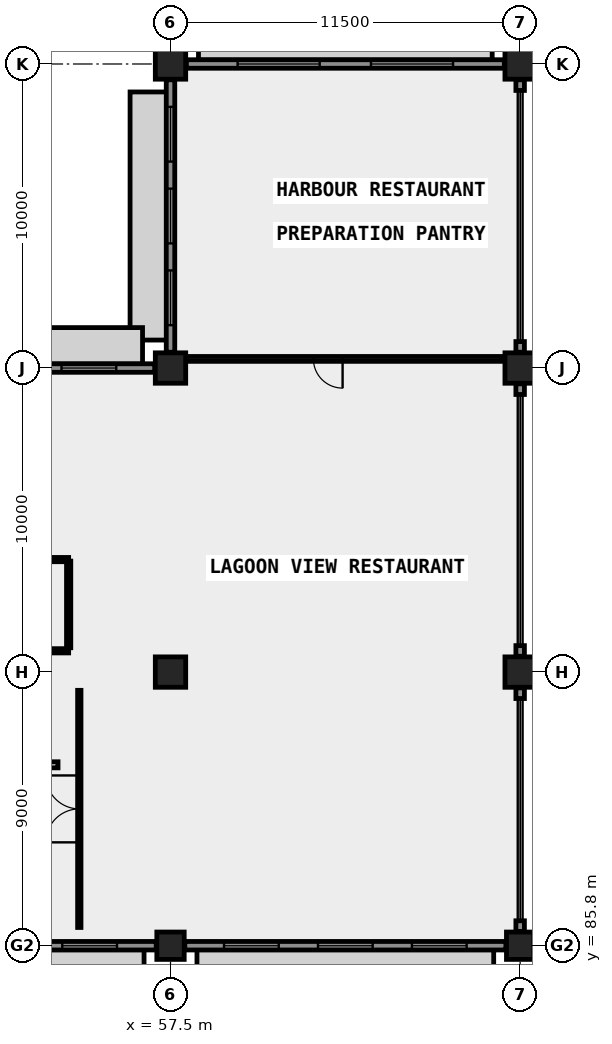
"""IFC4 building model, lengths in metres.
Left out: names, types, materials, properties, quantities, classifications, styles, units other than length and angle.
Written with IfcOpenShell. Run it as: python <this file> out.ifc"""

import sys

from ifc_helpers import new_model, si_unit, direction, frame, frame_2d, origin, origin_2d, place, context, subcontext, project, spatial, rectangle, extrude, element, fill, save


model = new_model("IFC4")
c1 = context("Model", 3, precision=1e-05, world=origin(), true_north=direction((0.0, 1.0)))
c2 = subcontext(c1, "Body", "Model", "MODEL_VIEW")
j1 = project(units=[si_unit("LENGTHUNIT", "METRE"), si_unit("PLANEANGLEUNIT", "RADIAN")], contexts=[c1])
p1 = place(None, origin())
s1 = spatial("IfcSite", under=j1, at=p1, CompositionType="ELEMENT")
p2 = place(p1, origin())
s2 = spatial("IfcBuilding", under=s1, at=p2, CompositionType="ELEMENT")
p3 = place(p2, frame((0.0, 0.0, 13.8)))
s3 = spatial("IfcBuildingStorey", under=s2, at=p3, CompositionType="ELEMENT", Elevation=13.8)
p4 = place(p3, frame((57.5, 85.8, 0.0), z_axis=(0.0, 0.0, 1.0), x_axis=(1.0, 0.0, 0.0)))
e1 = element("IfcColumn", 1, at=p4, inside=s3, PredefinedType="COLUMN", context=c2, shape_type="SweptSolid", body=[
    extrude(rectangle(XDim=0.9, YDim=0.9, at=origin_2d()), origin(), (0.0, 0.0, 1.0), 4.5),
])
for number, where, z_axis, x_axis in (
    (2, (57.5, 94.8, 0.0), (0.0, 0.0, 1.0), (1.0, 0.0, 0.0)),
    (3, (57.5, 104.8, 0.0), (0.0, 0.0, 1.0), (1.0, 0.0, 0.0)),
    (4, (57.5, 114.8, 0.0), (0.0, 0.0, 1.0), (1.0, 0.0, 0.0)),
):
    element("IfcColumn", number, at=place(p3, frame(where, z_axis=z_axis, x_axis=x_axis)), inside=s3, PredefinedType="COLUMN", context=c2, shape_type="SweptSolid", body=[
        extrude(rectangle(XDim=1.0, YDim=1.0, at=origin_2d()), origin(), (0.0, 0.0, 1.0), 4.5),
    ])
p5 = place(p3, frame((69.0, 85.8, 0.0), z_axis=(0.0, 0.0, 1.0), x_axis=(1.0, 0.0, 0.0)))
e5 = element("IfcColumn", 5, at=p5, inside=s3, PredefinedType="COLUMN", context=c2, shape_type="SweptSolid", body=[
    extrude(rectangle(XDim=0.9, YDim=0.9, at=origin_2d()), origin(), (0.0, 0.0, 1.0), 4.5),
])
for number, where, z_axis, x_axis in (
    (6, (69.0, 94.8, 0.0), (0.0, 0.0, 1.0), (1.0, 0.0, 0.0)),
    (7, (69.0, 104.8, 0.0), (0.0, 0.0, 1.0), (1.0, 0.0, 0.0)),
    (8, (69.0, 114.8, 0.0), (0.0, 0.0, 1.0), (1.0, 0.0, 0.0)),
):
    element("IfcColumn", number, at=place(p3, frame(where, z_axis=z_axis, x_axis=x_axis)), inside=s3, PredefinedType="COLUMN", context=c2, shape_type="SweptSolid", body=[
        extrude(rectangle(XDim=1.0, YDim=1.0, at=origin_2d()), origin(), (0.0, 0.0, 1.0), 4.5),
    ])
p6 = place(p3, frame((46.47, 85.8, 0.0), z_axis=(0.0, 0.0, 1.0), x_axis=(1.0, 0.0, 0.0)))
e9 = element("IfcWall", 9, at=p6, inside=s3, PredefinedType="SOLIDWALL", context=c2, shape_type="SweptSolid", body=[
    extrude(rectangle(XDim=10.56, YDim=0.28, at=frame_2d((5.28, 0.0))), origin(), (0.0, 0.0, 1.0), 3.45),
])
p7 = place(p6, frame((1.29, 0.0, 0.85)))
e10 = element("IfcOpeningElement", 10, at=p7, cuts=e9, PredefinedType="OPENING", context=c2, shape_type="SweptSolid", body=[
    extrude(rectangle(XDim=1.8, YDim=1.95, at=frame_2d((0.9, 0.975))), frame((0.0, 0.15, 0.0), z_axis=(0.0, -1.0, 0.0), x_axis=(1.0, 0.0, 0.0)), (0.0, 0.0, 1.0), 0.3),
])
p8 = place(p6, frame((4.38, 0.0, 0.85)))
e11 = element("IfcOpeningElement", 11, at=p8, cuts=e9, PredefinedType="OPENING", context=c2, shape_type="SweptSolid", body=[
    extrude(rectangle(XDim=1.8, YDim=1.95, at=frame_2d((0.9, 0.975))), frame((0.0, 0.15, 0.0), z_axis=(0.0, -1.0, 0.0), x_axis=(1.0, 0.0, 0.0)), (0.0, 0.0, 1.0), 0.3),
])
p9 = place(p6, frame((7.47, 0.0, 0.85)))
e12 = element("IfcOpeningElement", 12, at=p9, cuts=e9, PredefinedType="OPENING", context=c2, shape_type="SweptSolid", body=[
    extrude(rectangle(XDim=1.8, YDim=1.95, at=frame_2d((0.9, 0.975))), frame((0.0, 0.15, 0.0), z_axis=(0.0, -1.0, 0.0), x_axis=(1.0, 0.0, 0.0)), (0.0, 0.0, 1.0), 0.3),
])
p10 = place(p3, frame((57.97, 85.8, 0.0), z_axis=(0.0, 0.0, 1.0), x_axis=(1.0, 0.0, 0.0)))
e13 = element("IfcWall", 13, at=p10, inside=s3, PredefinedType="SOLIDWALL", context=c2, shape_type="SweptSolid", body=[
    extrude(rectangle(XDim=10.56, YDim=0.28, at=frame_2d((5.28, 0.0))), origin(), (0.0, 0.0, 1.0), 3.45),
])
p11 = place(p10, frame((1.29, 0.0, 0.85)))
e14 = element("IfcOpeningElement", 14, at=p11, cuts=e13, PredefinedType="OPENING", context=c2, shape_type="SweptSolid", body=[
    extrude(rectangle(XDim=1.8, YDim=1.95, at=frame_2d((0.9, 0.975))), frame((0.0, 0.15, 0.0), z_axis=(0.0, -1.0, 0.0), x_axis=(1.0, 0.0, 0.0)), (0.0, 0.0, 1.0), 0.3),
])
p12 = place(p10, frame((4.38, 0.0, 0.85)))
e15 = element("IfcOpeningElement", 15, at=p12, cuts=e13, PredefinedType="OPENING", context=c2, shape_type="SweptSolid", body=[
    extrude(rectangle(XDim=1.8, YDim=1.95, at=frame_2d((0.9, 0.975))), frame((0.0, 0.15, 0.0), z_axis=(0.0, -1.0, 0.0), x_axis=(1.0, 0.0, 0.0)), (0.0, 0.0, 1.0), 0.3),
])
p13 = place(p10, frame((7.47, 0.0, 0.85)))
e16 = element("IfcOpeningElement", 16, at=p13, cuts=e13, PredefinedType="OPENING", context=c2, shape_type="SweptSolid", body=[
    extrude(rectangle(XDim=1.8, YDim=1.95, at=frame_2d((0.9, 0.975))), frame((0.0, 0.15, 0.0), z_axis=(0.0, -1.0, 0.0), x_axis=(1.0, 0.0, 0.0)), (0.0, 0.0, 1.0), 0.3),
])
for number, where, z_axis, x_axis in (
    (17, (69.0, 86.27, 0.0), (0.0, 0.0, 1.0), (0.0, 1.0, 0.0)),
    (18, (69.0, 93.93, 0.0), (0.0, 0.0, 1.0), (0.0, 1.0, 0.0)),
):
    element("IfcWall", number, at=place(p3, frame(where, z_axis=z_axis, x_axis=x_axis)), inside=s3, PredefinedType="SOLIDWALL", context=c2, shape_type="SweptSolid", body=[
        extrude(rectangle(XDim=0.35, YDim=0.28, at=frame_2d((0.175, 0.0))), origin(), (0.0, 0.0, 1.0), 4.23),
    ])
p14 = place(p3, frame((69.0, 95.32, 0.0), z_axis=(0.0, 0.0, 1.0), x_axis=(0.0, 1.0, 0.0)))
e19 = element("IfcWall", 19, at=p14, inside=s3, PredefinedType="SOLIDWALL", context=c2, shape_type="SweptSolid", body=[
    extrude(rectangle(XDim=0.35, YDim=0.28, at=frame_2d((0.175, 0.0))), origin(), (0.0, 0.0, 1.0), 4.23),
])
p15 = place(p3, frame((69.0, 103.93, 0.0), z_axis=(0.0, 0.0, 1.0), x_axis=(0.0, 1.0, 0.0)))
e20 = element("IfcWall", 20, at=p15, inside=s3, PredefinedType="SOLIDWALL", context=c2, shape_type="SweptSolid", body=[
    extrude(rectangle(XDim=0.35, YDim=0.28, at=frame_2d((0.175, 0.0))), origin(), (0.0, 0.0, 1.0), 4.23),
])
p16 = place(p3, frame((69.0, 105.32, 0.0), z_axis=(0.0, 0.0, 1.0), x_axis=(0.0, 1.0, 0.0)))
e21 = element("IfcWall", 21, at=p16, inside=s3, PredefinedType="SOLIDWALL", context=c2, shape_type="SweptSolid", body=[
    extrude(rectangle(XDim=0.35, YDim=0.28, at=frame_2d((0.175, 0.0))), origin(), (0.0, 0.0, 1.0), 4.23),
])
p17 = place(p3, frame((69.0, 113.93, 0.0), z_axis=(0.0, 0.0, 1.0), x_axis=(0.0, 1.0, 0.0)))
e22 = element("IfcWall", 22, at=p17, inside=s3, PredefinedType="SOLIDWALL", context=c2, shape_type="SweptSolid", body=[
    extrude(rectangle(XDim=0.35, YDim=0.28, at=frame_2d((0.175, 0.0))), origin(), (0.0, 0.0, 1.0), 4.23),
])
p18 = place(p3, frame((58.02, 114.8, 0.0), z_axis=(0.0, 0.0, 1.0), x_axis=(1.0, 0.0, 0.0)))
e23 = element("IfcWall", 23, at=p18, inside=s3, PredefinedType="SOLIDWALL", context=c2, shape_type="SweptSolid", body=[
    extrude(rectangle(XDim=10.46, YDim=0.28, at=frame_2d((5.23, 0.0))), origin(), (0.0, 0.0, 1.0), 3.45),
])
p19 = place(p18, frame((1.687, 0.0, 0.85)))
e24 = element("IfcOpeningElement", 24, at=p19, cuts=e23, PredefinedType="OPENING", context=c2, shape_type="SweptSolid", body=[
    extrude(rectangle(XDim=2.7, YDim=2.15, at=frame_2d((1.35, 1.075))), frame((0.0, 0.15, 0.0), z_axis=(0.0, -1.0, 0.0), x_axis=(1.0, 0.0, 0.0)), (0.0, 0.0, 1.0), 0.3),
])
p20 = place(p18, frame((6.073, 0.0, 0.85)))
e25 = element("IfcOpeningElement", 25, at=p20, cuts=e23, PredefinedType="OPENING", context=c2, shape_type="SweptSolid", body=[
    extrude(rectangle(XDim=2.7, YDim=2.15, at=frame_2d((1.35, 1.075))), frame((0.0, 0.15, 0.0), z_axis=(0.0, -1.0, 0.0), x_axis=(1.0, 0.0, 0.0)), (0.0, 0.0, 1.0), 0.3),
])
p21 = place(p3, frame((57.5, 105.32, 0.0), z_axis=(0.0, 0.0, 1.0), x_axis=(0.0, 1.0, 0.0)))
e26 = element("IfcWall", 26, at=p21, inside=s3, PredefinedType="SOLIDWALL", context=c2, shape_type="SweptSolid", body=[
    extrude(rectangle(XDim=8.96, YDim=0.28, at=frame_2d((4.48, 0.0))), origin(), (0.0, 0.0, 1.0), 3.45),
])
p22 = place(p21, frame((0.89, 0.0, 0.85)))
e27 = element("IfcOpeningElement", 27, at=p22, cuts=e26, PredefinedType="OPENING", context=c2, shape_type="SweptSolid", body=[
    extrude(rectangle(XDim=1.8, YDim=1.95, at=frame_2d((0.9, 0.975))), frame((0.0, 0.15, 0.0), z_axis=(0.0, -1.0, 0.0), x_axis=(1.0, 0.0, 0.0)), (0.0, 0.0, 1.0), 0.3),
])
p23 = place(p21, frame((3.58, 0.0, 0.85)))
e28 = element("IfcOpeningElement", 28, at=p23, cuts=e26, PredefinedType="OPENING", context=c2, shape_type="SweptSolid", body=[
    extrude(rectangle(XDim=1.8, YDim=1.95, at=frame_2d((0.9, 0.975))), frame((0.0, 0.15, 0.0), z_axis=(0.0, -1.0, 0.0), x_axis=(1.0, 0.0, 0.0)), (0.0, 0.0, 1.0), 0.3),
])
p24 = place(p21, frame((6.27, 0.0, 0.85)))
e29 = element("IfcOpeningElement", 29, at=p24, cuts=e26, PredefinedType="OPENING", context=c2, shape_type="SweptSolid", body=[
    extrude(rectangle(XDim=1.8, YDim=1.95, at=frame_2d((0.9, 0.975))), frame((0.0, 0.15, 0.0), z_axis=(0.0, -1.0, 0.0), x_axis=(1.0, 0.0, 0.0)), (0.0, 0.0, 1.0), 0.3),
])
p25 = place(p3, frame((46.52, 104.8, 0.0), z_axis=(0.0, 0.0, 1.0), x_axis=(1.0, 0.0, 0.0)))
e30 = element("IfcWall", 30, at=p25, inside=s3, PredefinedType="SOLIDWALL", context=c2, shape_type="SweptSolid", body=[
    extrude(rectangle(XDim=10.46, YDim=0.28, at=frame_2d((5.23, 0.0))), origin(), (0.0, 0.0, 1.0), 3.45),
])
p26 = place(p25, frame((1.265, 0.0, 0.85)))
e31 = element("IfcOpeningElement", 31, at=p26, cuts=e30, PredefinedType="OPENING", context=c2, shape_type="SweptSolid", body=[
    extrude(rectangle(XDim=1.8, YDim=1.95, at=frame_2d((0.9, 0.975))), frame((0.0, 0.15, 0.0), z_axis=(0.0, -1.0, 0.0), x_axis=(1.0, 0.0, 0.0)), (0.0, 0.0, 1.0), 0.3),
])
p27 = place(p25, frame((4.33, 0.0, 0.85)))
e32 = element("IfcOpeningElement", 32, at=p27, cuts=e30, PredefinedType="OPENING", context=c2, shape_type="SweptSolid", body=[
    extrude(rectangle(XDim=1.8, YDim=1.95, at=frame_2d((0.9, 0.975))), frame((0.0, 0.15, 0.0), z_axis=(0.0, -1.0, 0.0), x_axis=(1.0, 0.0, 0.0)), (0.0, 0.0, 1.0), 0.3),
])
p28 = place(p25, frame((7.395, 0.0, 0.85)))
e33 = element("IfcOpeningElement", 33, at=p28, cuts=e30, PredefinedType="OPENING", context=c2, shape_type="SweptSolid", body=[
    extrude(rectangle(XDim=1.8, YDim=1.95, at=frame_2d((0.9, 0.975))), frame((0.0, 0.15, 0.0), z_axis=(0.0, -1.0, 0.0), x_axis=(1.0, 0.0, 0.0)), (0.0, 0.0, 1.0), 0.3),
])
p29 = place(p3, frame((47.55, 95.5, 0.0), z_axis=(0.0, 0.0, 1.0), x_axis=(1.0, 0.0, 0.0)))
e34 = element("IfcWall", 34, at=p29, inside=s3, PredefinedType="PLUMBINGWALL", context=c2, shape_type="SweptSolid", body=[
    extrude(rectangle(XDim=6.6, YDim=0.14, at=frame_2d((3.3, 0.0))), origin(), (0.0, 0.0, 1.0), 4.22),
])
p30 = place(p29, frame((0.72, 0.0, 0.0)))
e35 = element("IfcOpeningElement", 35, at=p30, cuts=e34, PredefinedType="OPENING", context=c2, shape_type="SweptSolid", body=[
    extrude(rectangle(XDim=0.95, YDim=2.1, at=frame_2d((0.475, 1.05))), frame((0.0, 0.08, 0.0), z_axis=(0.0, -1.0, 0.0), x_axis=(1.0, 0.0, 0.0)), (0.0, 0.0, 1.0), 0.16),
])
p31 = place(p29, frame((2.9, 0.0, 0.0)))
e36 = element("IfcOpeningElement", 36, at=p31, cuts=e34, PredefinedType="OPENING", context=c2, shape_type="SweptSolid", body=[
    extrude(rectangle(XDim=0.92, YDim=2.1, at=frame_2d((0.46, 1.05))), frame((0.0, 0.08, 0.0), z_axis=(0.0, -1.0, 0.0), x_axis=(1.0, 0.0, 0.0)), (0.0, 0.0, 1.0), 0.16),
])
p32 = place(p29, frame((5.0, 0.0, 0.0)))
e37 = element("IfcOpeningElement", 37, at=p32, cuts=e34, PredefinedType="OPENING", context=c2, shape_type="SweptSolid", body=[
    extrude(rectangle(XDim=0.92, YDim=2.1, at=frame_2d((0.46, 1.05))), frame((0.0, 0.08, 0.0), z_axis=(0.0, -1.0, 0.0), x_axis=(1.0, 0.0, 0.0)), (0.0, 0.0, 1.0), 0.16),
])
p33 = place(p3, frame((54.15, 95.6, 0.0), z_axis=(0.0, 0.0, 1.0), x_axis=(0.0, 1.0, 0.0)))
e38 = element("IfcWall", 38, at=p33, inside=s3, PredefinedType="PLUMBINGWALL", context=c2, shape_type="SweptSolid", body=[
    extrude(rectangle(XDim=2.85, YDim=0.14, at=frame_2d((1.425, 0.0))), origin(), (0.0, 0.0, 1.0), 4.22),
])
p34 = place(p3, frame((47.55, 98.5, 0.0), z_axis=(0.0, 0.0, 1.0), x_axis=(1.0, 0.0, 0.0)))
e39 = element("IfcWall", 39, at=p34, inside=s3, PredefinedType="PLUMBINGWALL", context=c2, shape_type="SweptSolid", body=[
    extrude(rectangle(XDim=6.6, YDim=0.14, at=frame_2d((3.3, 0.0))), origin(), (0.0, 0.0, 1.0), 4.22),
])
p35 = place(p3, frame((24.4, 91.75, 0.0), z_axis=(0.0, 0.0, 1.0), x_axis=(1.0, 0.0, 0.0)))
e40 = element("IfcWall", 40, at=p35, inside=s3, PredefinedType="PARTITIONING", context=c2, shape_type="SweptSolid", body=[
    extrude(rectangle(XDim=29.4, YDim=0.2, at=frame_2d((14.7, 0.0))), origin(), (0.0, 0.0, 1.0), 4.22),
])
p36 = place(p35, frame((4.2, 0.0, 0.0)))
e41 = element("IfcOpeningElement", 41, at=p36, cuts=e40, PredefinedType="OPENING", context=c2, shape_type="SweptSolid", body=[
    extrude(rectangle(XDim=1.8, YDim=2.2, at=frame_2d((0.9, 1.1))), frame((0.0, 0.11, 0.0), z_axis=(0.0, -1.0, 0.0), x_axis=(1.0, 0.0, 0.0)), (0.0, 0.0, 1.0), 0.22),
])
p37 = place(p35, frame((16.5, 0.0, 0.0)))
e42 = element("IfcOpeningElement", 42, at=p37, cuts=e40, PredefinedType="OPENING", context=c2, shape_type="SweptSolid", body=[
    extrude(rectangle(XDim=0.98, YDim=2.15, at=frame_2d((0.49, 1.075))), frame((0.0, 0.11, 0.0), z_axis=(0.0, -1.0, 0.0), x_axis=(1.0, 0.0, 0.0)), (0.0, 0.0, 1.0), 0.22),
])
p38 = place(p3, frame((54.5, 86.4, 0.0), z_axis=(0.0, 0.0, 1.0), x_axis=(0.0, 1.0, 0.0)))
e43 = element("IfcWall", 43, at=p38, inside=s3, PredefinedType="MOVABLE", context=c2, shape_type="SweptSolid", body=[
    extrude(rectangle(XDim=7.8, YDim=0.11, at=frame_2d((3.9, 0.0))), origin(), (0.0, 0.0, 1.0), 4.22),
])
p39 = place(p38, frame((2.8, 0.0, 0.0)))
e44 = element("IfcOpeningElement", 44, at=p39, cuts=e43, PredefinedType="OPENING", context=c2, shape_type="SweptSolid", body=[
    extrude(rectangle(XDim=2.2, YDim=2.4, at=frame_2d((1.1, 1.2))), frame((0.0, 0.065, 0.0), z_axis=(0.0, -1.0, 0.0), x_axis=(1.0, 0.0, 0.0)), (0.0, 0.0, 1.0), 0.13),
])
p40 = place(p3, frame((58.0, 105.1, 0.0), z_axis=(0.0, 0.0, 1.0), x_axis=(1.0, 0.0, 0.0)))
e45 = element("IfcWall", 45, at=p40, inside=s3, PredefinedType="PARTITIONING", context=c2, shape_type="SweptSolid", body=[
    extrude(rectangle(XDim=10.4, YDim=0.16, at=frame_2d((5.2, 0.0))), origin(), (0.0, 0.0, 1.0), 4.22),
])
p41 = place(p40, frame((4.2, 0.0, 0.0)))
e46 = element("IfcOpeningElement", 46, at=p41, cuts=e45, PredefinedType="OPENING", context=c2, shape_type="SweptSolid", body=[
    extrude(rectangle(XDim=0.96, YDim=2.1, at=frame_2d((0.48, 1.05))), frame((0.0, 0.09, 0.0), z_axis=(0.0, -1.0, 0.0), x_axis=(1.0, 0.0, 0.0)), (0.0, 0.0, 1.0), 0.18),
])
p42 = place(p9, origin())
e47 = element("IfcWindow", 47, at=p42, inside=s3, PartitioningType="SINGLE_PANEL", PredefinedType="WINDOW", context=c2, shape_type="SweptSolid", body=[
    extrude(rectangle(XDim=1.8, YDim=1.95, at=frame_2d((0.9, 0.975))), frame((0.0, 0.03, 0.0), z_axis=(0.0, -1.0, 0.0), x_axis=(1.0, 0.0, 0.0)), (0.0, 0.0, 1.0), 0.06),
])
fill(e12, e47)
p43 = place(p11, origin())
e48 = element("IfcWindow", 48, at=p43, inside=s3, PartitioningType="SINGLE_PANEL", PredefinedType="WINDOW", context=c2, shape_type="SweptSolid", body=[
    extrude(rectangle(XDim=1.8, YDim=1.95, at=frame_2d((0.9, 0.975))), frame((0.0, 0.03, 0.0), z_axis=(0.0, -1.0, 0.0), x_axis=(1.0, 0.0, 0.0)), (0.0, 0.0, 1.0), 0.06),
])
fill(e14, e48)
p44 = place(p12, origin())
e49 = element("IfcWindow", 49, at=p44, inside=s3, PartitioningType="SINGLE_PANEL", PredefinedType="WINDOW", context=c2, shape_type="SweptSolid", body=[
    extrude(rectangle(XDim=1.8, YDim=1.95, at=frame_2d((0.9, 0.975))), frame((0.0, 0.03, 0.0), z_axis=(0.0, -1.0, 0.0), x_axis=(1.0, 0.0, 0.0)), (0.0, 0.0, 1.0), 0.06),
])
fill(e15, e49)
p45 = place(p13, origin())
e50 = element("IfcWindow", 50, at=p45, inside=s3, PartitioningType="SINGLE_PANEL", PredefinedType="WINDOW", context=c2, shape_type="SweptSolid", body=[
    extrude(rectangle(XDim=1.8, YDim=1.95, at=frame_2d((0.9, 0.975))), frame((0.0, 0.03, 0.0), z_axis=(0.0, -1.0, 0.0), x_axis=(1.0, 0.0, 0.0)), (0.0, 0.0, 1.0), 0.06),
])
fill(e16, e50)
p46 = place(p19, origin())
e51 = element("IfcWindow", 51, at=p46, inside=s3, PartitioningType="SINGLE_PANEL", PredefinedType="WINDOW", context=c2, shape_type="SweptSolid", body=[
    extrude(rectangle(XDim=2.7, YDim=2.15, at=frame_2d((1.35, 1.075))), frame((0.0, 0.03, 0.0), z_axis=(0.0, -1.0, 0.0), x_axis=(1.0, 0.0, 0.0)), (0.0, 0.0, 1.0), 0.06),
])
fill(e24, e51)
p47 = place(p20, origin())
e52 = element("IfcWindow", 52, at=p47, inside=s3, PartitioningType="SINGLE_PANEL", PredefinedType="WINDOW", context=c2, shape_type="SweptSolid", body=[
    extrude(rectangle(XDim=2.7, YDim=2.15, at=frame_2d((1.35, 1.075))), frame((0.0, 0.03, 0.0), z_axis=(0.0, -1.0, 0.0), x_axis=(1.0, 0.0, 0.0)), (0.0, 0.0, 1.0), 0.06),
])
fill(e25, e52)
p48 = place(p22, origin())
e53 = element("IfcWindow", 53, at=p48, inside=s3, PartitioningType="SINGLE_PANEL", PredefinedType="WINDOW", context=c2, shape_type="SweptSolid", body=[
    extrude(rectangle(XDim=1.8, YDim=1.95, at=frame_2d((0.9, 0.975))), frame((0.0, 0.03, 0.0), z_axis=(0.0, -1.0, 0.0), x_axis=(1.0, 0.0, 0.0)), (0.0, 0.0, 1.0), 0.06),
])
fill(e27, e53)
p49 = place(p23, origin())
e54 = element("IfcWindow", 54, at=p49, inside=s3, PartitioningType="SINGLE_PANEL", PredefinedType="WINDOW", context=c2, shape_type="SweptSolid", body=[
    extrude(rectangle(XDim=1.8, YDim=1.95, at=frame_2d((0.9, 0.975))), frame((0.0, 0.03, 0.0), z_axis=(0.0, -1.0, 0.0), x_axis=(1.0, 0.0, 0.0)), (0.0, 0.0, 1.0), 0.06),
])
fill(e28, e54)
p50 = place(p24, origin())
e55 = element("IfcWindow", 55, at=p50, inside=s3, PartitioningType="SINGLE_PANEL", PredefinedType="WINDOW", context=c2, shape_type="SweptSolid", body=[
    extrude(rectangle(XDim=1.8, YDim=1.95, at=frame_2d((0.9, 0.975))), frame((0.0, 0.03, 0.0), z_axis=(0.0, -1.0, 0.0), x_axis=(1.0, 0.0, 0.0)), (0.0, 0.0, 1.0), 0.06),
])
fill(e29, e55)
p51 = place(p28, origin())
e56 = element("IfcWindow", 56, at=p51, inside=s3, PartitioningType="SINGLE_PANEL", PredefinedType="WINDOW", context=c2, shape_type="SweptSolid", body=[
    extrude(rectangle(XDim=1.8, YDim=1.95, at=frame_2d((0.9, 0.975))), frame((0.0, 0.03, 0.0), z_axis=(0.0, -1.0, 0.0), x_axis=(1.0, 0.0, 0.0)), (0.0, 0.0, 1.0), 0.06),
])
fill(e33, e56)
p52 = place(p39, origin())
e57 = element("IfcDoor", 57, at=p52, inside=s3, OperationType="DOUBLE_DOOR_SINGLE_SWING", PredefinedType="DOOR", context=c2, shape_type="SweptSolid", body=[
    extrude(rectangle(XDim=2.2, YDim=2.4, at=frame_2d((1.1, 1.2))), frame((0.0, 0.025, 0.0), z_axis=(0.0, -1.0, 0.0), x_axis=(1.0, 0.0, 0.0)), (0.0, 0.0, 1.0), 0.05),
])
fill(e44, e57)
p53 = place(p41, origin())
e58 = element("IfcDoor", 58, at=p53, inside=s3, OperationType="SINGLE_SWING_RIGHT", PredefinedType="DOOR", context=c2, shape_type="SweptSolid", body=[
    extrude(rectangle(XDim=0.96, YDim=2.1, at=frame_2d((0.48, 1.05))), frame((0.0, 0.025, 0.0), z_axis=(0.0, -1.0, 0.0), x_axis=(1.0, 0.0, 0.0)), (0.0, 0.0, 1.0), 0.05),
])
fill(e46, e58)
save(model, sys.argv[1])
